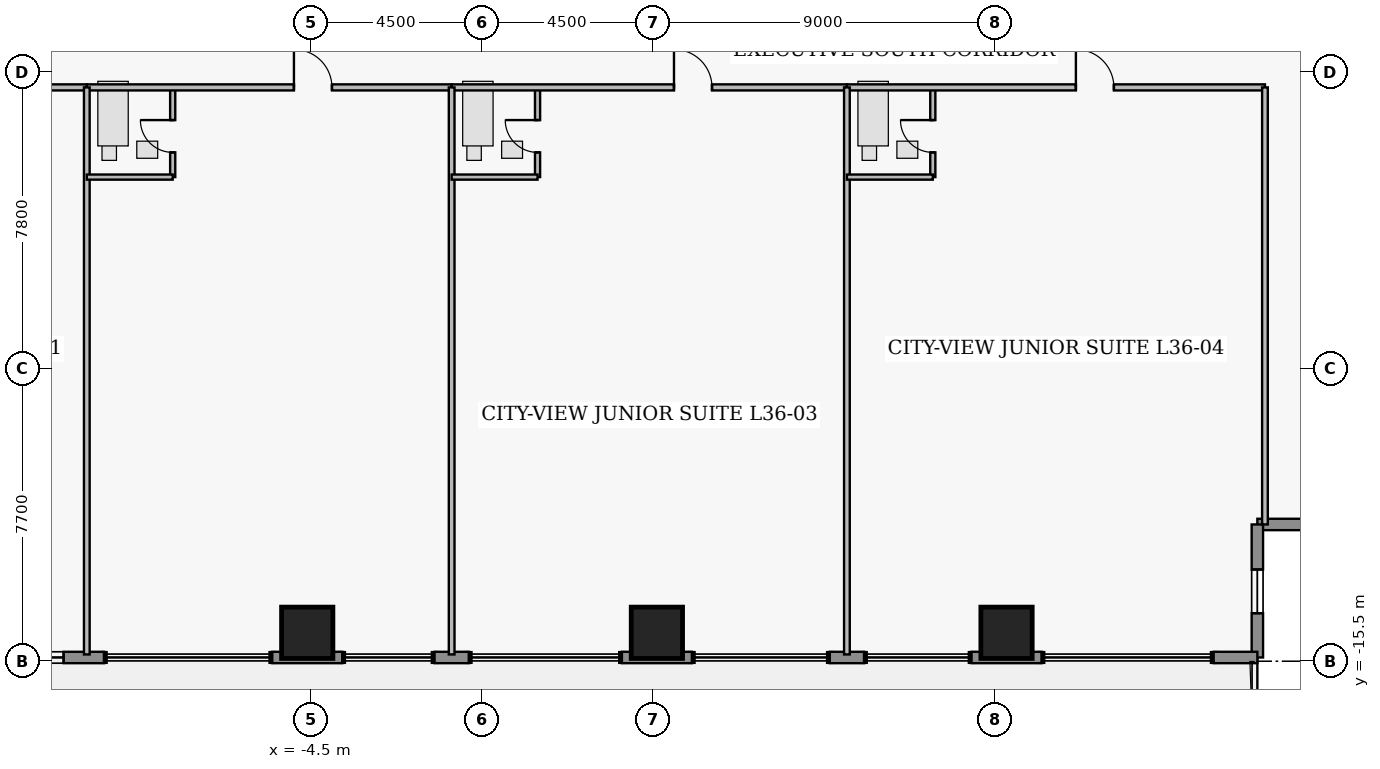
"""IFC4 building model, lengths in metres.
Left out: names, types, materials, properties, quantities, classifications, styles, units other than length and angle.
Written with IfcOpenShell. Run it as: python <this file> out.ifc"""

import sys

from ifc_helpers import new_model, si_unit, direction, frame, frame_2d, origin, origin_2d, place, context, subcontext, project, spatial, rectangle, extrude, element, fill, save


model = new_model("IFC4")
c1 = context("Model", 3, precision=1e-05, world=origin(), true_north=direction((0.0, 1.0)))
c2 = subcontext(c1, "Body", "Model", "MODEL_VIEW")
j1 = project(units=[si_unit("LENGTHUNIT", "METRE"), si_unit("PLANEANGLEUNIT", "RADIAN")], contexts=[c1])
p1 = place(None, origin())
s1 = spatial("IfcSite", under=j1, at=p1, CompositionType="ELEMENT")
p2 = place(p1, origin())
s2 = spatial("IfcBuilding", under=s1, at=p2, CompositionType="ELEMENT")
p3 = place(p2, frame((0.0, 0.0, 143.1)))
s3 = spatial("IfcBuildingStorey", under=s2, at=p3, CompositionType="ELEMENT", Elevation=143.1)
for number, where, z_axis, x_axis in (
    (1, (-4.6, -14.75, 0.0), (0.0, 0.0, 1.0), (1.0, 0.0, 0.0)),
    (2, (4.6, -14.75, 0.0), (0.0, 0.0, 1.0), (1.0, 0.0, 0.0)),
    (3, (13.8, -14.75, 0.0), (0.0, 0.0, 1.0), (1.0, 0.0, 0.0)),
):
    element("IfcColumn", number, at=place(p3, frame(where, z_axis=z_axis, x_axis=x_axis)), inside=s3, PredefinedType="COLUMN", context=c2, shape_type="SweptSolid", body=[
        extrude(rectangle(XDim=1.35, YDim=1.35, at=origin_2d()), origin(), (0.0, 0.0, 1.0), 3.65),
    ])
p4 = place(p3, frame((23.9, -11.9, 0.0), z_axis=(0.0, 0.0, 1.0), x_axis=(-1.0, 0.0, 0.0)))
e4 = element("IfcWall", 4, at=p4, inside=s3, PredefinedType="STANDARD", context=c2, shape_type="SweptSolid", body=[
    extrude(rectangle(XDim=3.5, YDim=0.3, at=frame_2d((1.75, 0.0))), origin(), (0.0, 0.0, 1.0), 3.43),
])
p5 = place(p4, frame((1.065, 0.0, 1.25)))
e5 = element("IfcOpeningElement", 5, at=p5, cuts=e4, PredefinedType="OPENING", context=c2, shape_type="SweptSolid", body=[
    extrude(rectangle(XDim=1.15, YDim=1.55, at=frame_2d((0.575, 0.775))), frame((0.0, 0.16, 0.0), z_axis=(0.0, -1.0, 0.0), x_axis=(1.0, 0.0, 0.0)), (0.0, 0.0, 1.0), 0.32),
])
p6 = place(p3, frame((20.4, -11.9, 0.0), z_axis=(0.0, 0.0, 1.0), x_axis=(0.0, -1.0, 0.0)))
e6 = element("IfcWall", 6, at=p6, inside=s3, PredefinedType="STANDARD", context=c2, shape_type="SweptSolid", body=[
    extrude(rectangle(XDim=3.5, YDim=0.3, at=frame_2d((1.75, 0.0))), origin(), (0.0, 0.0, 1.0), 3.43),
])
p7 = place(p6, frame((1.185, 0.0, 1.25)))
e7 = element("IfcOpeningElement", 7, at=p7, cuts=e6, PredefinedType="OPENING", context=c2, shape_type="SweptSolid", body=[
    extrude(rectangle(XDim=1.15, YDim=1.55, at=frame_2d((0.575, 0.775))), frame((0.0, 0.16, 0.0), z_axis=(0.0, -1.0, 0.0), x_axis=(1.0, 0.0, 0.0)), (0.0, 0.0, 1.0), 0.32),
])
p8 = place(p3, frame((20.4, -15.4, 0.0), z_axis=(0.0, 0.0, 1.0), x_axis=(-1.0, 0.0, 0.0)))
e8 = element("IfcWall", 8, at=p8, inside=s3, PredefinedType="STANDARD", context=c2, shape_type="SweptSolid", body=[
    extrude(rectangle(XDim=1.15, YDim=0.3, at=frame_2d((0.575, 0.0))), origin(), (0.0, 0.0, 1.0), 3.43),
])
p9 = place(p3, frame((14.72, -15.4, 0.0), z_axis=(0.0, 0.0, 1.0), x_axis=(-1.0, 0.0, 0.0)))
e9 = element("IfcWall", 9, at=p9, inside=s3, PredefinedType="STANDARD", context=c2, shape_type="SweptSolid", body=[
    extrude(rectangle(XDim=1.84, YDim=0.3, at=frame_2d((0.92, 0.0))), origin(), (0.0, 0.0, 1.0), 3.43),
])
p10 = place(p3, frame((10.05, -15.4, 0.0), z_axis=(0.0, 0.0, 1.0), x_axis=(-1.0, 0.0, 0.0)))
e10 = element("IfcWall", 10, at=p10, inside=s3, PredefinedType="STANDARD", context=c2, shape_type="SweptSolid", body=[
    extrude(rectangle(XDim=0.9, YDim=0.3, at=frame_2d((0.45, 0.0))), origin(), (0.0, 0.0, 1.0), 3.43),
])
p11 = place(p3, frame((5.52, -15.4, 0.0), z_axis=(0.0, 0.0, 1.0), x_axis=(-1.0, 0.0, 0.0)))
e11 = element("IfcWall", 11, at=p11, inside=s3, PredefinedType="STANDARD", context=c2, shape_type="SweptSolid", body=[
    extrude(rectangle(XDim=1.84, YDim=0.3, at=frame_2d((0.92, 0.0))), origin(), (0.0, 0.0, 1.0), 3.43),
])
p12 = place(p3, frame((-0.35, -15.4, 0.0), z_axis=(0.0, 0.0, 1.0), x_axis=(-1.0, 0.0, 0.0)))
e12 = element("IfcWall", 12, at=p12, inside=s3, PredefinedType="STANDARD", context=c2, shape_type="SweptSolid", body=[
    extrude(rectangle(XDim=0.9, YDim=0.3, at=frame_2d((0.45, 0.0))), origin(), (0.0, 0.0, 1.0), 3.43),
])
p13 = place(p3, frame((-3.68, -15.4, 0.0), z_axis=(0.0, 0.0, 1.0), x_axis=(-1.0, 0.0, 0.0)))
e13 = element("IfcWall", 13, at=p13, inside=s3, PredefinedType="STANDARD", context=c2, shape_type="SweptSolid", body=[
    extrude(rectangle(XDim=1.84, YDim=0.3, at=frame_2d((0.92, 0.0))), origin(), (0.0, 0.0, 1.0), 3.43),
])
p14 = place(p3, frame((-9.95, -15.4, 0.0), z_axis=(0.0, 0.0, 1.0), x_axis=(-1.0, 0.0, 0.0)))
e14 = element("IfcWall", 14, at=p14, inside=s3, PredefinedType="STANDARD", context=c2, shape_type="SweptSolid", body=[
    extrude(rectangle(XDim=10.45, YDim=0.3, at=frame_2d((5.225, 0.0))), origin(), (0.0, 0.0, 1.0), 3.43),
])
p15 = place(p14, frame((7.065, 0.0, 0.0)))
e15 = element("IfcOpeningElement", 15, at=p15, cuts=e14, PredefinedType="OPENING", context=c2, shape_type="SweptSolid", body=[
    extrude(rectangle(XDim=1.05, YDim=2.2, at=frame_2d((0.525, 1.1))), frame((0.0, 0.16, 0.0), z_axis=(0.0, -1.0, 0.0), x_axis=(1.0, 0.0, 0.0)), (0.0, 0.0, 1.0), 0.32),
])
p16 = place(p14, frame((1.06, 0.0, 0.85)))
e16 = element("IfcOpeningElement", 16, at=p16, cuts=e14, PredefinedType="OPENING", context=c2, shape_type="SweptSolid", body=[
    extrude(rectangle(XDim=1.6, YDim=1.8, at=frame_2d((0.8, 0.9))), frame((0.0, 0.16, 0.0), z_axis=(0.0, -1.0, 0.0), x_axis=(1.0, 0.0, 0.0)), (0.0, 0.0, 1.0), 0.32),
])
p17 = place(p14, frame((5.107, 0.0, 0.95)))
e17 = element("IfcOpeningElement", 17, at=p17, cuts=e14, PredefinedType="OPENING", context=c2, shape_type="SweptSolid", body=[
    extrude(rectangle(XDim=1.15, YDim=1.55, at=frame_2d((0.575, 0.775))), frame((0.0, 0.16, 0.0), z_axis=(0.0, -1.0, 0.0), x_axis=(1.0, 0.0, 0.0)), (0.0, 0.0, 1.0), 0.32),
])
p18 = place(p14, frame((8.712, 0.0, 0.95)))
e18 = element("IfcOpeningElement", 18, at=p18, cuts=e14, PredefinedType="OPENING", context=c2, shape_type="SweptSolid", body=[
    extrude(rectangle(XDim=1.15, YDim=1.55, at=frame_2d((0.575, 0.775))), frame((0.0, 0.16, 0.0), z_axis=(0.0, -1.0, 0.0), x_axis=(1.0, 0.0, 0.0)), (0.0, 0.0, 1.0), 0.32),
])
p19 = place(p3, frame((-20.6, -0.4, 0.0), z_axis=(0.0, 0.0, 1.0), x_axis=(1.0, 0.0, 0.0)))
e19 = element("IfcWall", 19, at=p19, inside=s3, PredefinedType="PARTITIONING", context=c2, shape_type="SweptSolid", body=[
    extrude(rectangle(XDim=10.2, YDim=0.16, at=frame_2d((5.1, 0.0))), origin(), (0.0, 0.0, 1.0), 3.43),
])
p20 = place(p19, frame((5.75, 0.0, 0.0)))
e20 = element("IfcOpeningElement", 20, at=p20, cuts=e19, PredefinedType="OPENING", context=c2, shape_type="SweptSolid", body=[
    extrude(rectangle(XDim=1.0, YDim=2.15, at=frame_2d((0.5, 1.075))), frame((0.0, 0.09, 0.0), z_axis=(0.0, -1.0, 0.0), x_axis=(1.0, 0.0, 0.0)), (0.0, 0.0, 1.0), 0.18),
])
p21 = place(p3, frame((-8.14, -2.76, 0.0), z_axis=(0.0, 0.0, 1.0), x_axis=(0.0, 1.0, 0.0)))
e21 = element("IfcWall", 21, at=p21, inside=s3, PredefinedType="PLUMBINGWALL", context=c2, shape_type="SweptSolid", body=[
    extrude(rectangle(XDim=2.36, YDim=0.135, at=frame_2d((1.18, 0.0))), origin(), (0.0, 0.0, 1.0), 3.43),
])
p22 = place(p21, frame((0.65, 0.0, 0.0)))
e22 = element("IfcOpeningElement", 22, at=p22, cuts=e21, PredefinedType="OPENING", context=c2, shape_type="SweptSolid", body=[
    extrude(rectangle(XDim=0.85, YDim=2.1, at=frame_2d((0.425, 1.05))), frame((0.0, 0.077, 0.0), z_axis=(0.0, -1.0, 0.0), x_axis=(1.0, 0.0, 0.0)), (0.0, 0.0, 1.0), 0.155),
])
p23 = place(p3, frame((-10.4, -0.4, 0.0), z_axis=(0.0, 0.0, 1.0), x_axis=(1.0, 0.0, 0.0)))
e23 = element("IfcWall", 23, at=p23, inside=s3, PredefinedType="PARTITIONING", context=c2, shape_type="SweptSolid", body=[
    extrude(rectangle(XDim=9.6, YDim=0.16, at=frame_2d((4.8, 0.0))), origin(), (0.0, 0.0, 1.0), 3.43),
])
p24 = place(p23, frame((5.45, 0.0, 0.0)))
e24 = element("IfcOpeningElement", 24, at=p24, cuts=e23, PredefinedType="OPENING", context=c2, shape_type="SweptSolid", body=[
    extrude(rectangle(XDim=1.0, YDim=2.15, at=frame_2d((0.5, 1.075))), frame((0.0, 0.09, 0.0), z_axis=(0.0, -1.0, 0.0), x_axis=(1.0, 0.0, 0.0)), (0.0, 0.0, 1.0), 0.18),
])
p25 = place(p3, frame((1.46, -2.76, 0.0), z_axis=(0.0, 0.0, 1.0), x_axis=(0.0, 1.0, 0.0)))
e25 = element("IfcWall", 25, at=p25, inside=s3, PredefinedType="PLUMBINGWALL", context=c2, shape_type="SweptSolid", body=[
    extrude(rectangle(XDim=2.36, YDim=0.135, at=frame_2d((1.18, 0.0))), origin(), (0.0, 0.0, 1.0), 3.43),
])
p26 = place(p25, frame((0.65, 0.0, 0.0)))
e26 = element("IfcOpeningElement", 26, at=p26, cuts=e25, PredefinedType="OPENING", context=c2, shape_type="SweptSolid", body=[
    extrude(rectangle(XDim=0.85, YDim=2.1, at=frame_2d((0.425, 1.05))), frame((0.0, 0.077, 0.0), z_axis=(0.0, -1.0, 0.0), x_axis=(1.0, 0.0, 0.0)), (0.0, 0.0, 1.0), 0.155),
])
p27 = place(p3, frame((-0.8, -0.4, 0.0), z_axis=(0.0, 0.0, 1.0), x_axis=(1.0, 0.0, 0.0)))
e27 = element("IfcWall", 27, at=p27, inside=s3, PredefinedType="PARTITIONING", context=c2, shape_type="SweptSolid", body=[
    extrude(rectangle(XDim=10.4, YDim=0.16, at=frame_2d((5.2, 0.0))), origin(), (0.0, 0.0, 1.0), 3.43),
])
p28 = place(p27, frame((5.85, 0.0, 0.0)))
e28 = element("IfcOpeningElement", 28, at=p28, cuts=e27, PredefinedType="OPENING", context=c2, shape_type="SweptSolid", body=[
    extrude(rectangle(XDim=1.0, YDim=2.15, at=frame_2d((0.5, 1.075))), frame((0.0, 0.09, 0.0), z_axis=(0.0, -1.0, 0.0), x_axis=(1.0, 0.0, 0.0)), (0.0, 0.0, 1.0), 0.18),
])
p29 = place(p3, frame((11.86, -2.76, 0.0), z_axis=(0.0, 0.0, 1.0), x_axis=(0.0, 1.0, 0.0)))
e29 = element("IfcWall", 29, at=p29, inside=s3, PredefinedType="PLUMBINGWALL", context=c2, shape_type="SweptSolid", body=[
    extrude(rectangle(XDim=2.36, YDim=0.135, at=frame_2d((1.18, 0.0))), origin(), (0.0, 0.0, 1.0), 3.43),
])
p30 = place(p29, frame((0.65, 0.0, 0.0)))
e30 = element("IfcOpeningElement", 30, at=p30, cuts=e29, PredefinedType="OPENING", context=c2, shape_type="SweptSolid", body=[
    extrude(rectangle(XDim=0.85, YDim=2.1, at=frame_2d((0.425, 1.05))), frame((0.0, 0.077, 0.0), z_axis=(0.0, -1.0, 0.0), x_axis=(1.0, 0.0, 0.0)), (0.0, 0.0, 1.0), 0.155),
])
p31 = place(p3, frame((9.6, -0.4, 0.0), z_axis=(0.0, 0.0, 1.0), x_axis=(1.0, 0.0, 0.0)))
e31 = element("IfcWall", 31, at=p31, inside=s3, PredefinedType="PARTITIONING", context=c2, shape_type="SweptSolid", body=[
    extrude(rectangle(XDim=11.0, YDim=0.16, at=frame_2d((5.5, 0.0))), origin(), (0.0, 0.0, 1.0), 3.43),
])
p32 = place(p31, frame((6.025, 0.0, 0.0)))
e32 = element("IfcOpeningElement", 32, at=p32, cuts=e31, PredefinedType="OPENING", context=c2, shape_type="SweptSolid", body=[
    extrude(rectangle(XDim=1.0, YDim=2.15, at=frame_2d((0.5, 1.075))), frame((0.0, 0.09, 0.0), z_axis=(0.0, -1.0, 0.0), x_axis=(1.0, 0.0, 0.0)), (0.0, 0.0, 1.0), 0.18),
])
p33 = place(p3, frame((-10.4, -15.32, 0.0), z_axis=(0.0, 0.0, 1.0), x_axis=(0.0, 1.0, 0.0)))
e33 = element("IfcWall", 33, at=p33, inside=s3, PredefinedType="PARTITIONING", context=c2, shape_type="SweptSolid", body=[
    extrude(rectangle(XDim=14.92, YDim=0.15, at=frame_2d((7.46, 0.0))), origin(), (0.0, 0.0, 1.0), 3.43),
])
p34 = place(p3, frame((-10.4, -2.76, 0.0), z_axis=(0.0, 0.0, 1.0), x_axis=(1.0, 0.0, 0.0)))
e34 = element("IfcWall", 34, at=p34, inside=s3, PredefinedType="PLUMBINGWALL", context=c2, shape_type="SweptSolid", body=[
    extrude(rectangle(XDim=2.26, YDim=0.135, at=frame_2d((1.13, 0.0))), origin(), (0.0, 0.0, 1.0), 3.43),
])
p35 = place(p3, frame((-0.8, -15.32, 0.0), z_axis=(0.0, 0.0, 1.0), x_axis=(0.0, 1.0, 0.0)))
e35 = element("IfcWall", 35, at=p35, inside=s3, PredefinedType="PARTITIONING", context=c2, shape_type="SweptSolid", body=[
    extrude(rectangle(XDim=14.92, YDim=0.15, at=frame_2d((7.46, 0.0))), origin(), (0.0, 0.0, 1.0), 3.43),
])
p36 = place(p3, frame((-0.8, -2.76, 0.0), z_axis=(0.0, 0.0, 1.0), x_axis=(1.0, 0.0, 0.0)))
e36 = element("IfcWall", 36, at=p36, inside=s3, PredefinedType="PLUMBINGWALL", context=c2, shape_type="SweptSolid", body=[
    extrude(rectangle(XDim=2.26, YDim=0.135, at=frame_2d((1.13, 0.0))), origin(), (0.0, 0.0, 1.0), 3.43),
])
p37 = place(p3, frame((9.6, -15.32, 0.0), z_axis=(0.0, 0.0, 1.0), x_axis=(0.0, 1.0, 0.0)))
e37 = element("IfcWall", 37, at=p37, inside=s3, PredefinedType="PARTITIONING", context=c2, shape_type="SweptSolid", body=[
    extrude(rectangle(XDim=14.92, YDim=0.15, at=frame_2d((7.46, 0.0))), origin(), (0.0, 0.0, 1.0), 3.43),
])
p38 = place(p3, frame((9.6, -2.76, 0.0), z_axis=(0.0, 0.0, 1.0), x_axis=(1.0, 0.0, 0.0)))
e38 = element("IfcWall", 38, at=p38, inside=s3, PredefinedType="PLUMBINGWALL", context=c2, shape_type="SweptSolid", body=[
    extrude(rectangle(XDim=2.26, YDim=0.135, at=frame_2d((1.13, 0.0))), origin(), (0.0, 0.0, 1.0), 3.43),
])
p39 = place(p3, frame((20.6, -11.9, 0.0), z_axis=(0.0, 0.0, 1.0), x_axis=(0.0, 1.0, 0.0)))
e39 = element("IfcWall", 39, at=p39, inside=s3, PredefinedType="PARTITIONING", context=c2, shape_type="SweptSolid", body=[
    extrude(rectangle(XDim=11.5, YDim=0.15, at=frame_2d((5.75, 0.0))), origin(), (0.0, 0.0, 1.0), 3.43),
])
p40 = place(p7, origin())
e40 = element("IfcWindow", 40, at=p40, inside=s3, PartitioningType="SINGLE_PANEL", PredefinedType="WINDOW", context=c2, shape_type="SweptSolid", body=[
    extrude(rectangle(XDim=1.15, YDim=1.55, at=frame_2d((0.575, 0.775))), frame((0.0, 0.03, 0.0), z_axis=(0.0, -1.0, 0.0), x_axis=(1.0, 0.0, 0.0)), (0.0, 0.0, 1.0), 0.06),
])
fill(e7, e40)
p41 = place(p16, origin())
e41 = element("IfcWindow", 41, at=p41, inside=s3, PartitioningType="SINGLE_PANEL", PredefinedType="WINDOW", context=c2, shape_type="SweptSolid", body=[
    extrude(rectangle(XDim=1.6, YDim=1.8, at=frame_2d((0.8, 0.9))), frame((0.0, 0.03, 0.0), z_axis=(0.0, -1.0, 0.0), x_axis=(1.0, 0.0, 0.0)), (0.0, 0.0, 1.0), 0.06),
])
fill(e16, e41)
p42 = place(p22, origin())
e42 = element("IfcDoor", 42, at=p42, inside=s3, OperationType="SINGLE_SWING_RIGHT", PredefinedType="DOOR", context=c2, shape_type="SweptSolid", body=[
    extrude(rectangle(XDim=0.85, YDim=2.1, at=frame_2d((0.425, 1.05))), frame((0.0, 0.025, 0.0), z_axis=(0.0, -1.0, 0.0), x_axis=(1.0, 0.0, 0.0)), (0.0, 0.0, 1.0), 0.05),
])
fill(e22, e42)
p43 = place(p24, origin())
e43 = element("IfcDoor", 43, at=p43, inside=s3, OperationType="SINGLE_SWING_LEFT", PredefinedType="DOOR", context=c2, shape_type="SweptSolid", body=[
    extrude(rectangle(XDim=1.0, YDim=2.15, at=frame_2d((0.5, 1.075))), frame((0.0, 0.025, 0.0), z_axis=(0.0, -1.0, 0.0), x_axis=(1.0, 0.0, 0.0)), (0.0, 0.0, 1.0), 0.05),
])
fill(e24, e43)
p44 = place(p26, origin())
e44 = element("IfcDoor", 44, at=p44, inside=s3, OperationType="SINGLE_SWING_RIGHT", PredefinedType="DOOR", context=c2, shape_type="SweptSolid", body=[
    extrude(rectangle(XDim=0.85, YDim=2.1, at=frame_2d((0.425, 1.05))), frame((0.0, 0.025, 0.0), z_axis=(0.0, -1.0, 0.0), x_axis=(1.0, 0.0, 0.0)), (0.0, 0.0, 1.0), 0.05),
])
fill(e26, e44)
p45 = place(p28, origin())
e45 = element("IfcDoor", 45, at=p45, inside=s3, OperationType="SINGLE_SWING_LEFT", PredefinedType="DOOR", context=c2, shape_type="SweptSolid", body=[
    extrude(rectangle(XDim=1.0, YDim=2.15, at=frame_2d((0.5, 1.075))), frame((0.0, 0.025, 0.0), z_axis=(0.0, -1.0, 0.0), x_axis=(1.0, 0.0, 0.0)), (0.0, 0.0, 1.0), 0.05),
])
fill(e28, e45)
p46 = place(p30, origin())
e46 = element("IfcDoor", 46, at=p46, inside=s3, OperationType="SINGLE_SWING_RIGHT", PredefinedType="DOOR", context=c2, shape_type="SweptSolid", body=[
    extrude(rectangle(XDim=0.85, YDim=2.1, at=frame_2d((0.425, 1.05))), frame((0.0, 0.025, 0.0), z_axis=(0.0, -1.0, 0.0), x_axis=(1.0, 0.0, 0.0)), (0.0, 0.0, 1.0), 0.05),
])
fill(e30, e46)
p47 = place(p32, origin())
e47 = element("IfcDoor", 47, at=p47, inside=s3, OperationType="SINGLE_SWING_LEFT", PredefinedType="DOOR", context=c2, shape_type="SweptSolid", body=[
    extrude(rectangle(XDim=1.0, YDim=2.15, at=frame_2d((0.5, 1.075))), frame((0.0, 0.025, 0.0), z_axis=(0.0, -1.0, 0.0), x_axis=(1.0, 0.0, 0.0)), (0.0, 0.0, 1.0), 0.05),
])
fill(e32, e47)
save(model, sys.argv[1])
